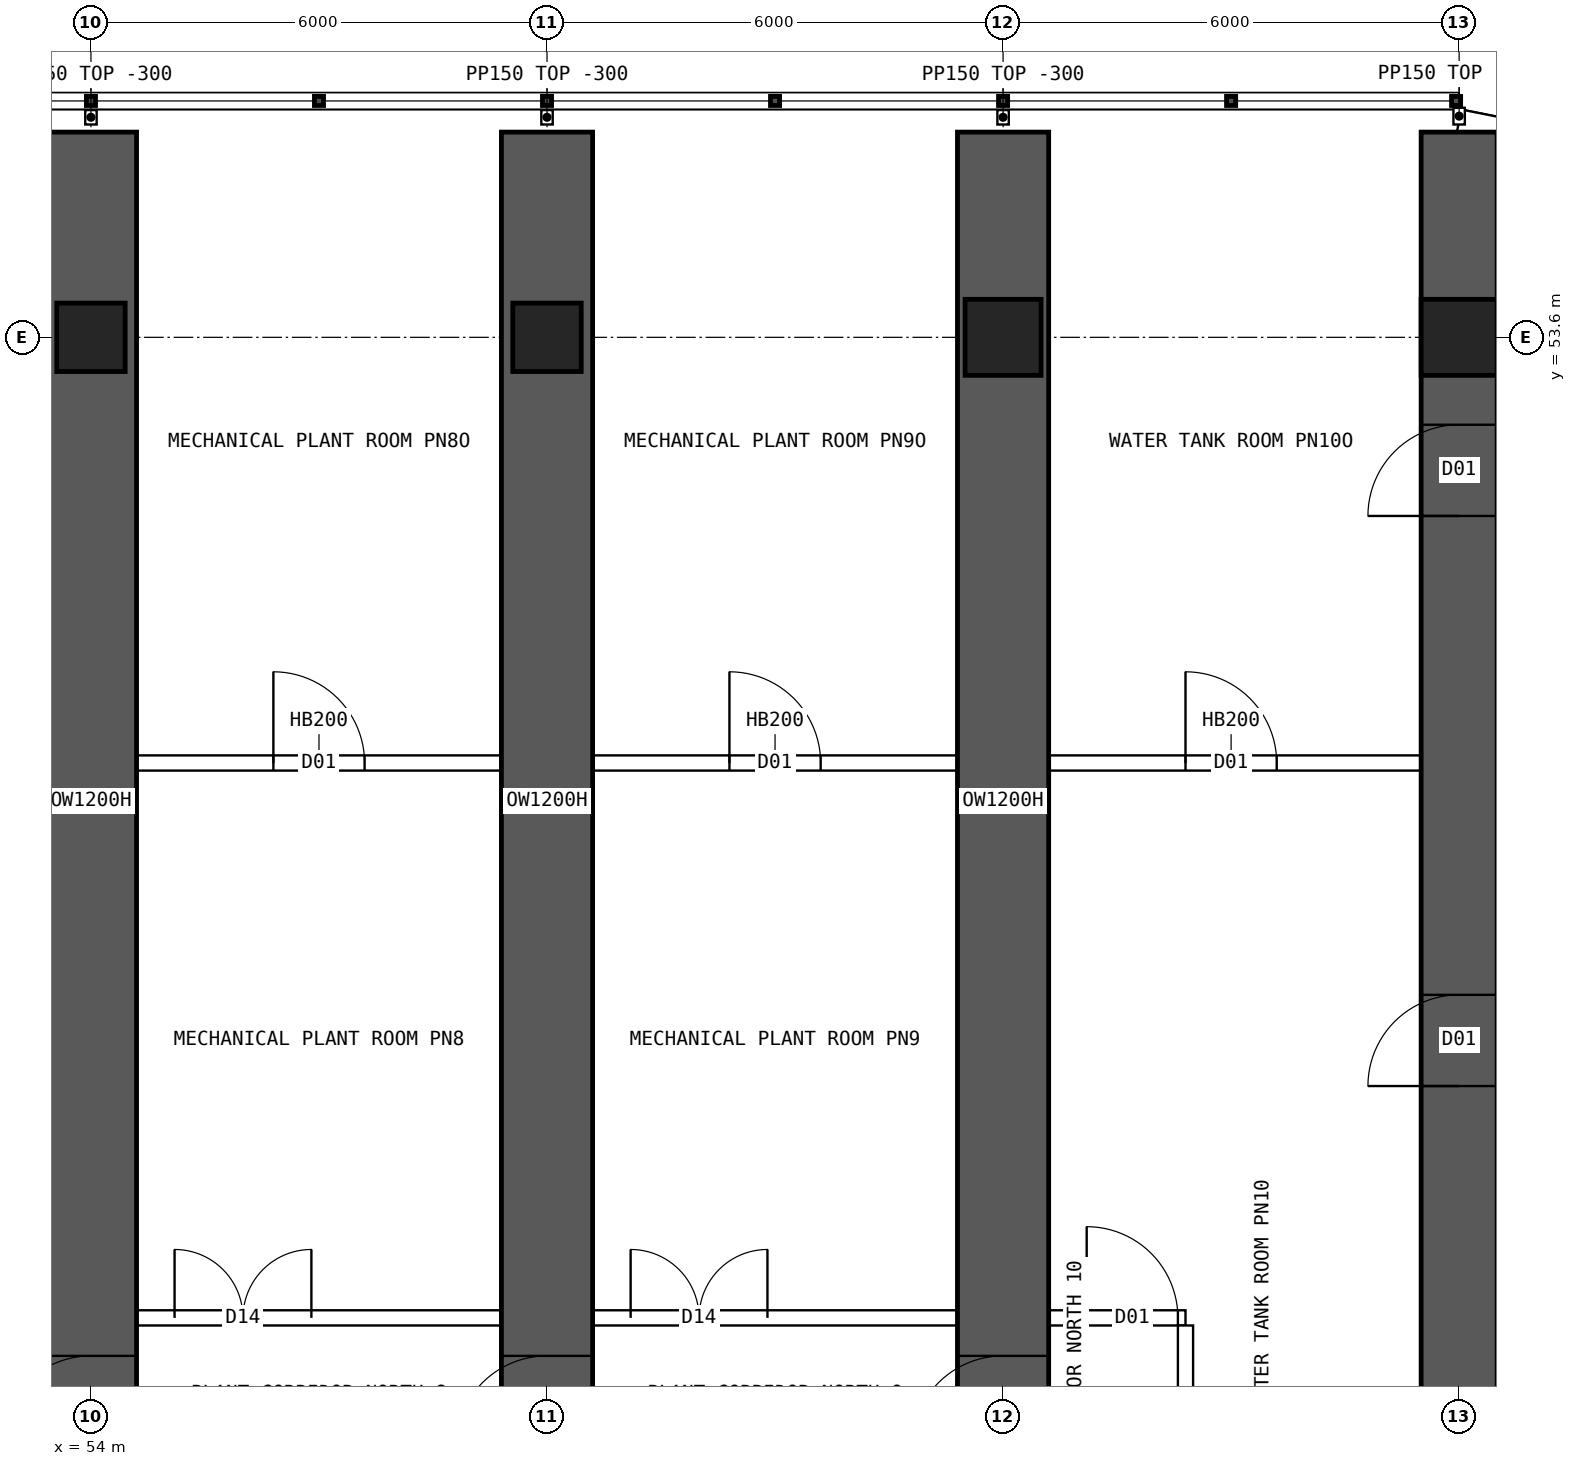
"""IFC4 building model, lengths in metres.
Left out: names, types, materials, properties, quantities, classifications, styles, units other than length and angle.
Written with IfcOpenShell. Run it as: python <this file> out.ifc"""

import sys

from ifc_helpers import new_model, si_unit, direction, frame, frame_2d, origin, origin_2d, place, context, subcontext, project, spatial, polyline, rectangle, hollow_rectangle, outline, extrude, element, fill, save


model = new_model("IFC4")
c1 = context("Model", 3, precision=1e-05, world=origin(), true_north=direction((0.0, 1.0)))
c2 = subcontext(c1, "Body", "Model", "MODEL_VIEW")
j1 = project(units=[si_unit("LENGTHUNIT", "METRE"), si_unit("PLANEANGLEUNIT", "RADIAN")], contexts=[c1])
p1 = place(None, origin())
s1 = spatial("IfcSite", under=j1, at=p1, CompositionType="ELEMENT")
p2 = place(p1, origin())
s2 = spatial("IfcBuilding", under=s1, at=p2, CompositionType="ELEMENT")
p3 = place(p2, frame((0.0, 0.0, 68.95)))
s3 = spatial("IfcBuildingStorey", under=s2, at=p3, CompositionType="ELEMENT", Elevation=68.95)
for number, where, z_axis, x_axis in (
    (1, (54.0, 53.6, 0.0), (0.0, 0.0, 1.0), (1.0, 0.0, 0.0)),
    (2, (60.0, 53.6, 0.0), (0.0, 0.0, 1.0), (1.0, 0.0, 0.0)),
):
    element("IfcColumn", number, at=place(p3, frame(where, z_axis=z_axis, x_axis=x_axis)), inside=s3, PredefinedType="COLUMN", context=c2, shape_type="SweptSolid", body=[
        extrude(hollow_rectangle(XDim=0.9, YDim=0.9, WallThickness=0.09, at=origin_2d()), origin(), (0.0, 0.0, 1.0), 7.2),
    ])
for number, where, z_axis, x_axis in (
    (3, (66.0, 53.6, 0.0), (0.0, 0.0, 1.0), (1.0, 0.0, 0.0)),
    (4, (72.0, 53.6, 0.0), (0.0, 0.0, 1.0), (1.0, 0.0, 0.0)),
):
    element("IfcColumn", number, at=place(p3, frame(where, z_axis=z_axis, x_axis=x_axis)), inside=s3, PredefinedType="COLUMN", context=c2, shape_type="SweptSolid", body=[
        extrude(hollow_rectangle(XDim=1.0, YDim=1.0, WallThickness=0.1, at=origin_2d()), origin(), (0.0, 0.0, 1.0), 7.2),
    ])
p4 = place(p3, frame((54.0, 38.7, 0.0), z_axis=(0.0, 0.0, 1.0), x_axis=(0.0, 1.0, 0.0)))
e5 = element("IfcWall", 5, at=p4, inside=s3, PredefinedType="SHEAR", context=c2, shape_type="SweptSolid", body=[
    extrude(rectangle(XDim=17.6, YDim=1.2, at=frame_2d((8.8, 0.0))), origin(), (0.0, 0.0, 1.0), 7.2),
])
p5 = place(p4, frame((0.3, 0.0, 0.0)))
e6 = element("IfcOpeningElement", 6, at=p5, cuts=e5, PredefinedType="OPENING", context=c2, shape_type="SweptSolid", body=[
    extrude(rectangle(XDim=1.2, YDim=2.1, at=frame_2d((0.6, 1.05))), frame((0.0, 0.61, 0.0), z_axis=(0.0, -1.0, 0.0), x_axis=(1.0, 0.0, 0.0)), (0.0, 0.0, 1.0), 1.22),
])
p6 = place(p3, frame((60.0, 38.7, 0.0), z_axis=(0.0, 0.0, 1.0), x_axis=(0.0, 1.0, 0.0)))
e7 = element("IfcWall", 7, at=p6, inside=s3, PredefinedType="SHEAR", context=c2, shape_type="SweptSolid", body=[
    extrude(rectangle(XDim=17.6, YDim=1.2, at=frame_2d((8.8, 0.0))), origin(), (0.0, 0.0, 1.0), 7.2),
])
p7 = place(p6, frame((0.3, 0.0, 0.0)))
e8 = element("IfcOpeningElement", 8, at=p7, cuts=e7, PredefinedType="OPENING", context=c2, shape_type="SweptSolid", body=[
    extrude(rectangle(XDim=1.2, YDim=2.1, at=frame_2d((0.6, 1.05))), frame((0.0, 0.61, 0.0), z_axis=(0.0, -1.0, 0.0), x_axis=(1.0, 0.0, 0.0)), (0.0, 0.0, 1.0), 1.22),
])
p8 = place(p3, frame((66.0, 38.7, 0.0), z_axis=(0.0, 0.0, 1.0), x_axis=(0.0, 1.0, 0.0)))
e9 = element("IfcWall", 9, at=p8, inside=s3, PredefinedType="SHEAR", context=c2, shape_type="SweptSolid", body=[
    extrude(rectangle(XDim=17.6, YDim=1.2, at=frame_2d((8.8, 0.0))), origin(), (0.0, 0.0, 1.0), 7.2),
])
p9 = place(p8, frame((0.3, 0.0, 0.0)))
e10 = element("IfcOpeningElement", 10, at=p9, cuts=e9, PredefinedType="OPENING", context=c2, shape_type="SweptSolid", body=[
    extrude(rectangle(XDim=1.2, YDim=2.1, at=frame_2d((0.6, 1.05))), frame((0.0, 0.61, 0.0), z_axis=(0.0, -1.0, 0.0), x_axis=(1.0, 0.0, 0.0)), (0.0, 0.0, 1.0), 1.22),
])
p10 = place(p3, frame((72.0, 7.7, 0.0), z_axis=(0.0, 0.0, 1.0), x_axis=(0.0, 1.0, 0.0)))
e11 = element("IfcWall", 11, at=p10, inside=s3, PredefinedType="SHEAR", context=c2, shape_type="SweptSolid", body=[
    extrude(rectangle(XDim=48.6, YDim=1.0, at=frame_2d((24.3, 0.0))), origin(), (0.0, 0.0, 1.0), 7.2),
])
p11 = place(p10, frame((3.85, 0.0, 0.0)))
e12 = element("IfcOpeningElement", 12, at=p11, cuts=e11, PredefinedType="OPENING", context=c2, shape_type="SweptSolid", body=[
    extrude(rectangle(XDim=1.2, YDim=2.1, at=frame_2d((0.6, 1.05))), frame((0.0, 0.51, 0.0), z_axis=(0.0, -1.0, 0.0), x_axis=(1.0, 0.0, 0.0)), (0.0, 0.0, 1.0), 1.02),
])
p12 = place(p10, frame((11.35, 0.0, 0.0)))
e13 = element("IfcOpeningElement", 13, at=p12, cuts=e11, PredefinedType="OPENING", context=c2, shape_type="SweptSolid", body=[
    extrude(rectangle(XDim=1.2, YDim=2.1, at=frame_2d((0.6, 1.05))), frame((0.0, 0.51, 0.0), z_axis=(0.0, -1.0, 0.0), x_axis=(1.0, 0.0, 0.0)), (0.0, 0.0, 1.0), 1.02),
])
p13 = place(p10, frame((43.55, 0.0, 0.0)))
e14 = element("IfcOpeningElement", 14, at=p13, cuts=e11, PredefinedType="OPENING", context=c2, shape_type="SweptSolid", body=[
    extrude(rectangle(XDim=1.2, YDim=2.1, at=frame_2d((0.6, 1.05))), frame((0.0, 0.51, 0.0), z_axis=(0.0, -1.0, 0.0), x_axis=(1.0, 0.0, 0.0)), (0.0, 0.0, 1.0), 1.02),
])
p14 = place(p10, frame((36.05, 0.0, 0.0)))
e15 = element("IfcOpeningElement", 15, at=p14, cuts=e11, PredefinedType="OPENING", context=c2, shape_type="SweptSolid", body=[
    extrude(rectangle(XDim=1.2, YDim=2.1, at=frame_2d((0.6, 1.05))), frame((0.0, 0.51, 0.0), z_axis=(0.0, -1.0, 0.0), x_axis=(1.0, 0.0, 0.0)), (0.0, 0.0, 1.0), 1.02),
])
p15 = place(p3, frame((75.157, 55.822, 0.0), z_axis=(0.0, 0.0, 1.0), x_axis=(-0.980787251524, 0.195080412259, 0.0)))
e16 = element("IfcWall", 16, at=p15, inside=s3, PredefinedType="SOLIDWALL", context=c2, shape_type="SweptSolid", body=[
    extrude(outline(polyline([(-0.03, -0.15), (3.249, -0.15), (3.189, 0.15), (0.03, 0.15), (-0.03, -0.15)])), origin(), (0.0, 0.0, 1.0), 6.9),
])
p16 = place(p3, frame((15.6, 40.7, 0.0), z_axis=(0.0, 0.0, 1.0), x_axis=(1.0, 0.0, 0.0)))
e17 = element("IfcWall", 17, at=p16, inside=s3, PredefinedType="SOLIDWALL", context=c2, shape_type="SweptSolid", body=[
    extrude(rectangle(XDim=52.8, YDim=0.2, at=frame_2d((26.4, 0.0))), origin(), (0.0, 0.0, 1.0), 6.9),
])
p17 = place(p16, frame((0.6, 0.0, 0.0)))
e18 = element("IfcOpeningElement", 18, at=p17, cuts=e17, PredefinedType="OPENING", context=c2, shape_type="SweptSolid", body=[
    extrude(rectangle(XDim=1.2, YDim=2.1, at=frame_2d((0.6, 1.05))), frame((0.0, 0.11, 0.0), z_axis=(0.0, -1.0, 0.0), x_axis=(1.0, 0.0, 0.0)), (0.0, 0.0, 1.0), 0.22),
])
p18 = place(p16, frame((3.5, 0.0, 0.0)))
e19 = element("IfcOpeningElement", 19, at=p18, cuts=e17, PredefinedType="OPENING", context=c2, shape_type="SweptSolid", body=[
    extrude(rectangle(XDim=1.8, YDim=2.4, at=frame_2d((0.9, 1.2))), frame((0.0, 0.11, 0.0), z_axis=(0.0, -1.0, 0.0), x_axis=(1.0, 0.0, 0.0)), (0.0, 0.0, 1.0), 0.22),
])
p19 = place(p16, frame((9.5, 0.0, 0.0)))
e20 = element("IfcOpeningElement", 20, at=p19, cuts=e17, PredefinedType="OPENING", context=c2, shape_type="SweptSolid", body=[
    extrude(rectangle(XDim=1.8, YDim=2.4, at=frame_2d((0.9, 1.2))), frame((0.0, 0.11, 0.0), z_axis=(0.0, -1.0, 0.0), x_axis=(1.0, 0.0, 0.0)), (0.0, 0.0, 1.0), 0.22),
])
p20 = place(p16, frame((15.5, 0.0, 0.0)))
e21 = element("IfcOpeningElement", 21, at=p20, cuts=e17, PredefinedType="OPENING", context=c2, shape_type="SweptSolid", body=[
    extrude(rectangle(XDim=1.8, YDim=2.4, at=frame_2d((0.9, 1.2))), frame((0.0, 0.11, 0.0), z_axis=(0.0, -1.0, 0.0), x_axis=(1.0, 0.0, 0.0)), (0.0, 0.0, 1.0), 0.22),
])
p21 = place(p16, frame((21.5, 0.0, 0.0)))
e22 = element("IfcOpeningElement", 22, at=p21, cuts=e17, PredefinedType="OPENING", context=c2, shape_type="SweptSolid", body=[
    extrude(rectangle(XDim=1.8, YDim=2.4, at=frame_2d((0.9, 1.2))), frame((0.0, 0.11, 0.0), z_axis=(0.0, -1.0, 0.0), x_axis=(1.0, 0.0, 0.0)), (0.0, 0.0, 1.0), 0.22),
])
p22 = place(p16, frame((27.5, 0.0, 0.0)))
e23 = element("IfcOpeningElement", 23, at=p22, cuts=e17, PredefinedType="OPENING", context=c2, shape_type="SweptSolid", body=[
    extrude(rectangle(XDim=1.8, YDim=2.4, at=frame_2d((0.9, 1.2))), frame((0.0, 0.11, 0.0), z_axis=(0.0, -1.0, 0.0), x_axis=(1.0, 0.0, 0.0)), (0.0, 0.0, 1.0), 0.22),
])
p23 = place(p16, frame((33.5, 0.0, 0.0)))
e24 = element("IfcOpeningElement", 24, at=p23, cuts=e17, PredefinedType="OPENING", context=c2, shape_type="SweptSolid", body=[
    extrude(rectangle(XDim=1.8, YDim=2.4, at=frame_2d((0.9, 1.2))), frame((0.0, 0.11, 0.0), z_axis=(0.0, -1.0, 0.0), x_axis=(1.0, 0.0, 0.0)), (0.0, 0.0, 1.0), 0.22),
])
p24 = place(p16, frame((39.5, 0.0, 0.0)))
e25 = element("IfcOpeningElement", 25, at=p24, cuts=e17, PredefinedType="OPENING", context=c2, shape_type="SweptSolid", body=[
    extrude(rectangle(XDim=1.8, YDim=2.4, at=frame_2d((0.9, 1.2))), frame((0.0, 0.11, 0.0), z_axis=(0.0, -1.0, 0.0), x_axis=(1.0, 0.0, 0.0)), (0.0, 0.0, 1.0), 0.22),
])
p25 = place(p16, frame((45.5, 0.0, 0.0)))
e26 = element("IfcOpeningElement", 26, at=p25, cuts=e17, PredefinedType="OPENING", context=c2, shape_type="SweptSolid", body=[
    extrude(rectangle(XDim=1.8, YDim=2.4, at=frame_2d((0.9, 1.2))), frame((0.0, 0.11, 0.0), z_axis=(0.0, -1.0, 0.0), x_axis=(1.0, 0.0, 0.0)), (0.0, 0.0, 1.0), 0.22),
])
p26 = place(p16, frame((51.5, 0.0, 0.0)))
e27 = element("IfcOpeningElement", 27, at=p26, cuts=e17, PredefinedType="OPENING", context=c2, shape_type="SweptSolid", body=[
    extrude(rectangle(XDim=1.2, YDim=2.1, at=frame_2d((0.6, 1.05))), frame((0.0, 0.11, 0.0), z_axis=(0.0, -1.0, 0.0), x_axis=(1.0, 0.0, 0.0)), (0.0, 0.0, 1.0), 0.22),
])
p27 = place(p3, frame((68.4, 23.4, 0.0), z_axis=(0.0, 0.0, 1.0), x_axis=(0.0, 1.0, 0.0)))
e28 = element("IfcWall", 28, at=p27, inside=s3, PredefinedType="SOLIDWALL", context=c2, shape_type="SweptSolid", body=[
    extrude(rectangle(XDim=17.2, YDim=0.2, at=frame_2d((8.6, 0.0))), origin(), (0.0, 0.0, 1.0), 6.9),
])
p28 = place(p3, frame((54.5, 48.0, 0.0), z_axis=(0.0, 0.0, 1.0), x_axis=(1.0, 0.0, 0.0)))
e29 = element("IfcWall", 29, at=p28, inside=s3, PredefinedType="SOLIDWALL", context=c2, shape_type="SweptSolid", body=[
    extrude(rectangle(XDim=5.0, YDim=0.2, at=frame_2d((2.5, 0.0))), origin(), (0.0, 0.0, 1.0), 6.9),
])
p29 = place(p28, frame((1.9, 0.0, 0.0)))
e30 = element("IfcOpeningElement", 30, at=p29, cuts=e29, PredefinedType="OPENING", context=c2, shape_type="SweptSolid", body=[
    extrude(rectangle(XDim=1.2, YDim=2.1, at=frame_2d((0.6, 1.05))), frame((0.0, 0.11, 0.0), z_axis=(0.0, -1.0, 0.0), x_axis=(1.0, 0.0, 0.0)), (0.0, 0.0, 1.0), 0.22),
])
p30 = place(p3, frame((60.5, 48.0, 0.0), z_axis=(0.0, 0.0, 1.0), x_axis=(1.0, 0.0, 0.0)))
e31 = element("IfcWall", 31, at=p30, inside=s3, PredefinedType="SOLIDWALL", context=c2, shape_type="SweptSolid", body=[
    extrude(rectangle(XDim=5.0, YDim=0.2, at=frame_2d((2.5, 0.0))), origin(), (0.0, 0.0, 1.0), 6.9),
])
p31 = place(p30, frame((1.9, 0.0, 0.0)))
e32 = element("IfcOpeningElement", 32, at=p31, cuts=e31, PredefinedType="OPENING", context=c2, shape_type="SweptSolid", body=[
    extrude(rectangle(XDim=1.2, YDim=2.1, at=frame_2d((0.6, 1.05))), frame((0.0, 0.11, 0.0), z_axis=(0.0, -1.0, 0.0), x_axis=(1.0, 0.0, 0.0)), (0.0, 0.0, 1.0), 0.22),
])
p32 = place(p3, frame((66.5, 48.0, 0.0), z_axis=(0.0, 0.0, 1.0), x_axis=(1.0, 0.0, 0.0)))
e33 = element("IfcWall", 33, at=p32, inside=s3, PredefinedType="SOLIDWALL", context=c2, shape_type="SweptSolid", body=[
    extrude(rectangle(XDim=5.0, YDim=0.2, at=frame_2d((2.5, 0.0))), origin(), (0.0, 0.0, 1.0), 6.9),
])
p33 = place(p32, frame((1.9, 0.0, 0.0)))
e34 = element("IfcOpeningElement", 34, at=p33, cuts=e33, PredefinedType="OPENING", context=c2, shape_type="SweptSolid", body=[
    extrude(rectangle(XDim=1.2, YDim=2.1, at=frame_2d((0.6, 1.05))), frame((0.0, 0.11, 0.0), z_axis=(0.0, -1.0, 0.0), x_axis=(1.0, 0.0, 0.0)), (0.0, 0.0, 1.0), 0.22),
])
for number, where, z_axis, x_axis in (
    (35, (54.0, 56.4, 0.0), (0.0, 0.0, 1.0), (0.0, 1.0, 0.0)),
    (36, (60.0, 56.4, 0.0), (0.0, 0.0, 1.0), (0.0, 1.0, 0.0)),
    (37, (66.0, 56.4, 0.0), (0.0, 0.0, 1.0), (0.0, 1.0, 0.0)),
):
    element("IfcWall", number, at=place(p3, frame(where, z_axis=z_axis, x_axis=x_axis)), inside=s3, PredefinedType="PARTITIONING", context=c2, shape_type="SweptSolid", body=[
        extrude(rectangle(XDim=0.19, YDim=0.15, at=frame_2d((0.095, 0.0))), origin(), (0.0, 0.0, 1.0), 6.9),
    ])
p34 = place(p3, frame((72.0, 56.4, 0.0), z_axis=(0.0, 0.0, 1.0), x_axis=(0.0, 1.0, 0.0)))
e38 = element("IfcWall", 38, at=p34, inside=s3, PredefinedType="PARTITIONING", context=c2, shape_type="SweptSolid", body=[
    extrude(rectangle(XDim=0.22, YDim=0.15, at=frame_2d((0.11, 0.0))), origin(), (0.0, 0.0, 1.0), 6.9),
])
p35 = place(p29, origin())
e39 = element("IfcDoor", 39, at=p35, inside=s3, OperationType="SINGLE_SWING_LEFT", PredefinedType="DOOR", context=c2, shape_type="SweptSolid", body=[
    extrude(rectangle(XDim=1.2, YDim=2.1, at=frame_2d((0.6, 1.05))), frame((0.0, 0.025, 0.0), z_axis=(0.0, -1.0, 0.0), x_axis=(1.0, 0.0, 0.0)), (0.0, 0.0, 1.0), 0.05),
])
fill(e30, e39)
p36 = place(p31, origin())
e40 = element("IfcDoor", 40, at=p36, inside=s3, OperationType="SINGLE_SWING_LEFT", PredefinedType="DOOR", context=c2, shape_type="SweptSolid", body=[
    extrude(rectangle(XDim=1.2, YDim=2.1, at=frame_2d((0.6, 1.05))), frame((0.0, 0.025, 0.0), z_axis=(0.0, -1.0, 0.0), x_axis=(1.0, 0.0, 0.0)), (0.0, 0.0, 1.0), 0.05),
])
fill(e32, e40)
p37 = place(p33, origin())
e41 = element("IfcDoor", 41, at=p37, inside=s3, OperationType="SINGLE_SWING_LEFT", PredefinedType="DOOR", context=c2, shape_type="SweptSolid", body=[
    extrude(rectangle(XDim=1.2, YDim=2.1, at=frame_2d((0.6, 1.05))), frame((0.0, 0.025, 0.0), z_axis=(0.0, -1.0, 0.0), x_axis=(1.0, 0.0, 0.0)), (0.0, 0.0, 1.0), 0.05),
])
fill(e34, e41)
p38 = place(p24, origin())
e42 = element("IfcDoor", 42, at=p38, inside=s3, OperationType="DOUBLE_DOOR_SINGLE_SWING", PredefinedType="DOOR", context=c2, shape_type="SweptSolid", body=[
    extrude(rectangle(XDim=1.8, YDim=2.4, at=frame_2d((0.9, 1.2))), frame((0.0, 0.025, 0.0), z_axis=(0.0, -1.0, 0.0), x_axis=(1.0, 0.0, 0.0)), (0.0, 0.0, 1.0), 0.05),
])
fill(e25, e42)
p39 = place(p25, origin())
e43 = element("IfcDoor", 43, at=p39, inside=s3, OperationType="DOUBLE_DOOR_SINGLE_SWING", PredefinedType="DOOR", context=c2, shape_type="SweptSolid", body=[
    extrude(rectangle(XDim=1.8, YDim=2.4, at=frame_2d((0.9, 1.2))), frame((0.0, 0.025, 0.0), z_axis=(0.0, -1.0, 0.0), x_axis=(1.0, 0.0, 0.0)), (0.0, 0.0, 1.0), 0.05),
])
fill(e26, e43)
p40 = place(p26, origin())
e44 = element("IfcDoor", 44, at=p40, inside=s3, OperationType="SINGLE_SWING_LEFT", PredefinedType="DOOR", context=c2, shape_type="SweptSolid", body=[
    extrude(rectangle(XDim=1.2, YDim=2.1, at=frame_2d((0.6, 1.05))), frame((0.0, 0.025, 0.0), z_axis=(0.0, -1.0, 0.0), x_axis=(1.0, 0.0, 0.0)), (0.0, 0.0, 1.0), 0.05),
])
fill(e27, e44)
p41 = place(p5, origin())
e45 = element("IfcDoor", 45, at=p41, inside=s3, OperationType="SINGLE_SWING_LEFT", PredefinedType="DOOR", context=c2, shape_type="SweptSolid", body=[
    extrude(rectangle(XDim=1.2, YDim=2.1, at=frame_2d((0.6, 1.05))), frame((0.0, 0.025, 0.0), z_axis=(0.0, -1.0, 0.0), x_axis=(1.0, 0.0, 0.0)), (0.0, 0.0, 1.0), 0.05),
])
fill(e6, e45)
p42 = place(p7, origin())
e46 = element("IfcDoor", 46, at=p42, inside=s3, OperationType="SINGLE_SWING_LEFT", PredefinedType="DOOR", context=c2, shape_type="SweptSolid", body=[
    extrude(rectangle(XDim=1.2, YDim=2.1, at=frame_2d((0.6, 1.05))), frame((0.0, 0.025, 0.0), z_axis=(0.0, -1.0, 0.0), x_axis=(1.0, 0.0, 0.0)), (0.0, 0.0, 1.0), 0.05),
])
fill(e8, e46)
p43 = place(p9, origin())
e47 = element("IfcDoor", 47, at=p43, inside=s3, OperationType="SINGLE_SWING_LEFT", PredefinedType="DOOR", context=c2, shape_type="SweptSolid", body=[
    extrude(rectangle(XDim=1.2, YDim=2.1, at=frame_2d((0.6, 1.05))), frame((0.0, 0.025, 0.0), z_axis=(0.0, -1.0, 0.0), x_axis=(1.0, 0.0, 0.0)), (0.0, 0.0, 1.0), 0.05),
])
fill(e10, e47)
p44 = place(p13, origin())
e48 = element("IfcDoor", 48, at=p44, inside=s3, OperationType="SINGLE_SWING_LEFT", PredefinedType="DOOR", context=c2, shape_type="SweptSolid", body=[
    extrude(rectangle(XDim=1.2, YDim=2.1, at=frame_2d((0.6, 1.05))), frame((0.0, -0.435, 0.0), z_axis=(0.0, -1.0, 0.0), x_axis=(1.0, 0.0, 0.0)), (0.0, 0.0, 1.0), 0.05),
])
fill(e14, e48)
p45 = place(p14, origin())
e49 = element("IfcDoor", 49, at=p45, inside=s3, OperationType="SINGLE_SWING_LEFT", PredefinedType="DOOR", context=c2, shape_type="SweptSolid", body=[
    extrude(rectangle(XDim=1.2, YDim=2.1, at=frame_2d((0.6, 1.05))), frame((0.0, -0.435, 0.0), z_axis=(0.0, -1.0, 0.0), x_axis=(1.0, 0.0, 0.0)), (0.0, 0.0, 1.0), 0.05),
])
fill(e15, e49)
save(model, sys.argv[1])
